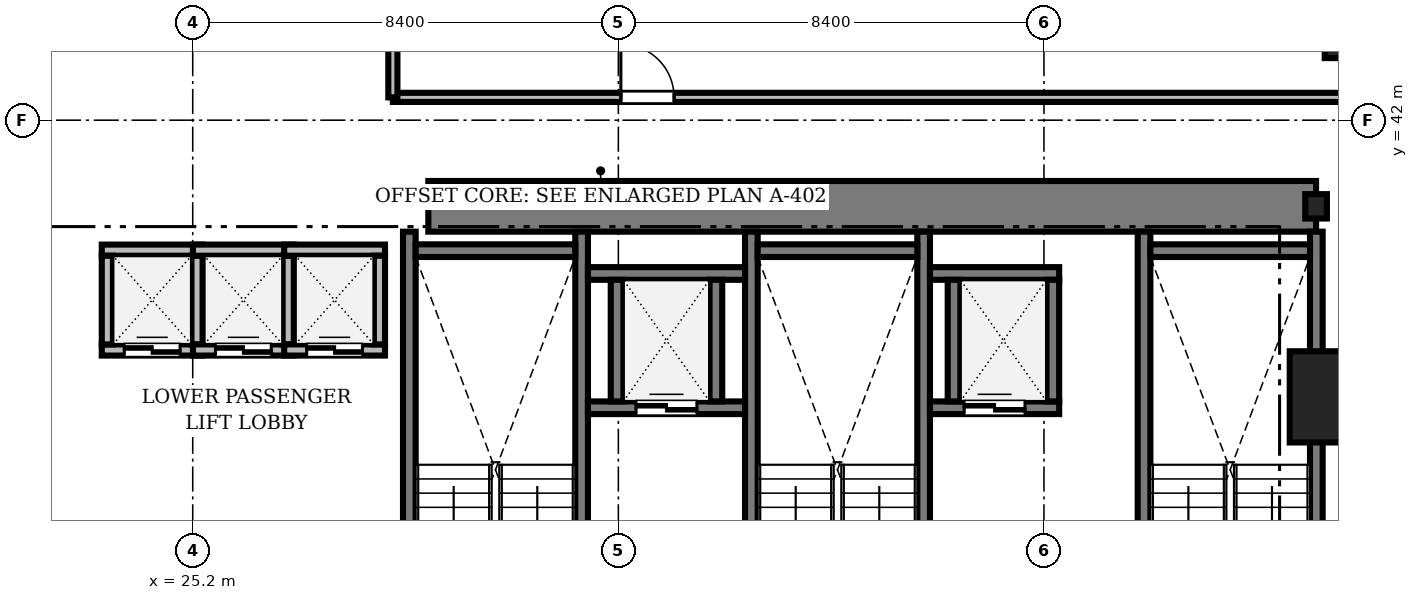
"""IFC4 building model, lengths in metres.
Left out: names, types, materials, properties, quantities, classifications, styles, units other than length and angle.
Written with IfcOpenShell. Run it as: python <this file> out.ifc"""

import sys

from ifc_helpers import new_model, si_unit, direction, frame, frame_2d, origin, origin_2d, place, context, subcontext, project, spatial, rectangle, i_section, extrude, source, transform, mapped, element, fill, save


model = new_model("IFC4")
c1 = context("Model", 3, precision=1e-05, world=origin(), true_north=direction((0.0, 1.0)))
c2 = subcontext(c1, "Body", "Model", "MODEL_VIEW")
j1 = project(units=[si_unit("LENGTHUNIT", "METRE"), si_unit("PLANEANGLEUNIT", "RADIAN")], contexts=[c1])
p1 = place(None, origin())
s1 = spatial("IfcSite", under=j1, at=p1, CompositionType="ELEMENT")
p2 = place(p1, origin())
s2 = spatial("IfcBuilding", under=s1, at=p2, CompositionType="ELEMENT")
p3 = place(p2, frame((0.0, 0.0, 27.6)))
s3 = spatial("IfcBuildingStorey", under=s2, at=p3, CompositionType="ELEMENT", Elevation=27.6)
m1 = source(origin(), c2, "Body", "SweptSolid", [
    extrude(rectangle(XDim=17.52, YDim=1.0, at=frame_2d((8.76, 0.0))), origin(), (0.0, 0.0, 1.0), 3.41),
])
p4 = place(p3, frame((29.85, 40.3, 0.0), z_axis=(0.0, 0.0, 1.0), x_axis=(1.0, 0.0, 0.0)))
e1 = element("IfcWall", 1, at=p4, inside=s3, PredefinedType="SHEAR", context=c2, shape_type="MappedRepresentation", body=[
    mapped(m1, transform((0.0, 0.0, 0.0), scale=1.0)),
])
m2 = source(origin(), c2, "Body", "SweptSolid", [
    extrude(i_section(OverallWidth=0.428, OverallDepth=0.481, WebThickness=0.04, FlangeThickness=0.063, FilletRadius=0.015, at=origin_2d()), origin(), (0.0, 0.0, 1.0), 3.41),
])
p5 = place(p3, frame((47.37, 40.3, 0.0), z_axis=(0.0, 0.0, 1.0), x_axis=(1.0, 0.0, 0.0)))
e2 = element("IfcColumn", 2, at=p5, inside=s3, PredefinedType="COLUMN", context=c2, shape_type="MappedRepresentation", body=[
    mapped(m2, transform((0.0, 0.0, 0.0), scale=1.0)),
])
m3 = source(origin(), c2, "Body", "SweptSolid", [
    extrude(rectangle(XDim=1.8, YDim=1.8, at=origin_2d()), origin(), (0.0, 0.0, 1.0), 3.41),
])
p6 = place(p3, frame((47.75, 36.54, 0.0), z_axis=(0.0, 0.0, 1.0), x_axis=(1.0, 0.0, 0.0)))
e3 = element("IfcColumn", 3, at=p6, inside=s3, PredefinedType="COLUMN", context=c2, shape_type="MappedRepresentation", body=[
    mapped(m3, transform((0.0, 0.0, 0.0), scale=1.0)),
])
m4 = source(origin(), c2, "Body", "SweptSolid", [
    extrude(i_section(OverallWidth=0.419, OverallDepth=0.449, WebThickness=0.031, FlangeThickness=0.048, FilletRadius=0.015, at=origin_2d()), origin(), (0.0, 0.0, 1.0), 3.41),
])
p7 = place(p3, frame((47.75, 43.45, 0.0), z_axis=(0.0, 0.0, 1.0), x_axis=(1.0, 0.0, 0.0)))
e4 = element("IfcColumn", 4, at=p7, inside=s3, PredefinedType="COLUMN", context=c2, shape_type="MappedRepresentation", body=[
    mapped(m4, transform((0.0, 0.0, 0.0), scale=1.0)),
])
m5 = source(origin(), c2, "Body", "SweptSolid", [
    extrude(rectangle(XDim=9.15, YDim=0.25, at=frame_2d((4.575, 0.0))), origin(), (0.0, 0.0, 1.0), 3.45),
])
for number, where, z_axis, x_axis in (
    (5, (29.475, 30.65, 0.0), (0.0, 0.0, 1.0), (0.0, 1.0, 0.0)),
    (6, (32.875, 30.65, 0.0), (0.0, 0.0, 1.0), (0.0, 1.0, 0.0)),
):
    element("IfcWall", number, at=place(p3, frame(where, z_axis=z_axis, x_axis=x_axis)), inside=s3, PredefinedType="SOLIDWALL", context=c2, shape_type="MappedRepresentation", body=[
        mapped(m5, transform((0.0, 0.0, 0.0), scale=1.0)),
    ])
m6 = source(origin(), c2, "Body", "SweptSolid", [
    extrude(rectangle(XDim=3.15, YDim=0.25, at=frame_2d((1.575, 0.0))), origin(), (0.0, 0.0, 1.0), 3.45),
])
p8 = place(p3, frame((29.6, 39.425, 0.0), z_axis=(0.0, 0.0, 1.0), x_axis=(1.0, 0.0, 0.0)))
e7 = element("IfcWall", 7, at=p8, inside=s3, PredefinedType="SOLIDWALL", context=c2, shape_type="MappedRepresentation", body=[
    mapped(m6, transform((0.0, 0.0, 0.0), scale=1.0)),
])
for number, where, z_axis, x_axis in (
    (8, (36.225, 30.65, 0.0), (0.0, 0.0, 1.0), (0.0, 1.0, 0.0)),
    (9, (39.625, 30.65, 0.0), (0.0, 0.0, 1.0), (0.0, 1.0, 0.0)),
):
    element("IfcWall", number, at=place(p3, frame(where, z_axis=z_axis, x_axis=x_axis)), inside=s3, PredefinedType="SOLIDWALL", context=c2, shape_type="MappedRepresentation", body=[
        mapped(m5, transform((0.0, 0.0, 0.0), scale=1.0)),
    ])
p9 = place(p3, frame((36.35, 39.425, 0.0), z_axis=(0.0, 0.0, 1.0), x_axis=(1.0, 0.0, 0.0)))
e10 = element("IfcWall", 10, at=p9, inside=s3, PredefinedType="SOLIDWALL", context=c2, shape_type="MappedRepresentation", body=[
    mapped(m6, transform((0.0, 0.0, 0.0), scale=1.0)),
])
for number, where, z_axis, x_axis in (
    (11, (43.975, 30.65, 0.0), (0.0, 0.0, 1.0), (0.0, 1.0, 0.0)),
    (12, (47.375, 30.65, 0.0), (0.0, 0.0, 1.0), (0.0, 1.0, 0.0)),
):
    element("IfcWall", number, at=place(p3, frame(where, z_axis=z_axis, x_axis=x_axis)), inside=s3, PredefinedType="SOLIDWALL", context=c2, shape_type="MappedRepresentation", body=[
        mapped(m5, transform((0.0, 0.0, 0.0), scale=1.0)),
    ])
p10 = place(p3, frame((44.1, 39.425, 0.0), z_axis=(0.0, 0.0, 1.0), x_axis=(1.0, 0.0, 0.0)))
e13 = element("IfcWall", 13, at=p10, inside=s3, PredefinedType="SOLIDWALL", context=c2, shape_type="MappedRepresentation", body=[
    mapped(m6, transform((0.0, 0.0, 0.0), scale=1.0)),
])
m7 = source(origin(), c2, "Body", "SweptSolid", [
    extrude(rectangle(XDim=1.99, YDim=0.22, at=frame_2d((0.995, 0.0))), origin(), (0.0, 0.0, 1.0), 3.41),
])
p11 = place(p3, frame((23.405, 37.465, 0.0), z_axis=(0.0, 0.0, 1.0), x_axis=(1.0, 0.0, 0.0)))
e14 = element("IfcWall", 14, at=p11, inside=s3, PredefinedType="SOLIDWALL", context=c2, shape_type="MappedRepresentation", body=[
    mapped(m7, transform((0.0, 0.0, 0.0), scale=1.0)),
])
m8 = source(origin(), c2, "Body", "SweptSolid", [
    extrude(rectangle(XDim=1.1, YDim=2.2, at=frame_2d((0.55, 1.1))), frame((0.0, 0.12, 0.0), z_axis=(0.0, -1.0, 0.0), x_axis=(1.0, 0.0, 0.0)), (0.0, 0.0, 1.0), 0.24),
])
p12 = place(p11, frame((0.445, 0.0, 0.0)))
e15 = element("IfcOpeningElement", 15, at=p12, cuts=e14, PredefinedType="OPENING", context=c2, shape_type="MappedRepresentation", body=[
    mapped(m8, transform((0.0, 0.0, 0.0), scale=1.0)),
])
p13 = place(p3, frame((23.405, 39.435, 0.0), z_axis=(0.0, 0.0, 1.0), x_axis=(1.0, 0.0, 0.0)))
e16 = element("IfcWall", 16, at=p13, inside=s3, PredefinedType="SOLIDWALL", context=c2, shape_type="MappedRepresentation", body=[
    mapped(m7, transform((0.0, 0.0, 0.0), scale=1.0)),
])
m9 = source(origin(), c2, "Body", "SweptSolid", [
    extrude(rectangle(XDim=1.75, YDim=0.22, at=frame_2d((0.875, 0.0))), origin(), (0.0, 0.0, 1.0), 3.41),
])
for number, where, z_axis, x_axis in (
    (17, (23.515, 37.575, 0.0), (0.0, 0.0, 1.0), (0.0, 1.0, 0.0)),
    (18, (25.285, 37.575, 0.0), (0.0, 0.0, 1.0), (0.0, 1.0, 0.0)),
):
    element("IfcWall", number, at=place(p3, frame(where, z_axis=z_axis, x_axis=x_axis)), inside=s3, PredefinedType="SOLIDWALL", context=c2, shape_type="MappedRepresentation", body=[
        mapped(m9, transform((0.0, 0.0, 0.0), scale=1.0)),
    ])
p14 = place(p3, frame((25.205, 37.465, 0.0), z_axis=(0.0, 0.0, 1.0), x_axis=(1.0, 0.0, 0.0)))
e19 = element("IfcWall", 19, at=p14, inside=s3, PredefinedType="SOLIDWALL", context=c2, shape_type="MappedRepresentation", body=[
    mapped(m7, transform((0.0, 0.0, 0.0), scale=1.0)),
])
p15 = place(p14, frame((0.445, 0.0, 0.0)))
e20 = element("IfcOpeningElement", 20, at=p15, cuts=e19, PredefinedType="OPENING", context=c2, shape_type="MappedRepresentation", body=[
    mapped(m8, transform((0.0, 0.0, 0.0), scale=1.0)),
])
p16 = place(p3, frame((25.205, 39.435, 0.0), z_axis=(0.0, 0.0, 1.0), x_axis=(1.0, 0.0, 0.0)))
e21 = element("IfcWall", 21, at=p16, inside=s3, PredefinedType="SOLIDWALL", context=c2, shape_type="MappedRepresentation", body=[
    mapped(m7, transform((0.0, 0.0, 0.0), scale=1.0)),
])
p17 = place(p3, frame((27.085, 37.575, 0.0), z_axis=(0.0, 0.0, 1.0), x_axis=(0.0, 1.0, 0.0)))
e22 = element("IfcWall", 22, at=p17, inside=s3, PredefinedType="SOLIDWALL", context=c2, shape_type="MappedRepresentation", body=[
    mapped(m9, transform((0.0, 0.0, 0.0), scale=1.0)),
])
m10 = source(origin(), c2, "Body", "SweptSolid", [
    extrude(rectangle(XDim=1.99, YDim=0.22, at=frame_2d((0.995, 0.0))), origin(), (0.0, 0.0, 1.0), 3.41),
])
p18 = place(p3, frame((27.005, 37.465, 0.0), z_axis=(0.0, 0.0, 1.0), x_axis=(1.0, 0.0, 0.0)))
e23 = element("IfcWall", 23, at=p18, inside=s3, PredefinedType="SOLIDWALL", context=c2, shape_type="MappedRepresentation", body=[
    mapped(m10, transform((0.0, 0.0, 0.0), scale=1.0)),
])
p19 = place(p18, frame((0.445, 0.0, 0.0)))
e24 = element("IfcOpeningElement", 24, at=p19, cuts=e23, PredefinedType="OPENING", context=c2, shape_type="MappedRepresentation", body=[
    mapped(m8, transform((0.0, 0.0, 0.0), scale=1.0)),
])
p20 = place(p3, frame((27.005, 39.435, 0.0), z_axis=(0.0, 0.0, 1.0), x_axis=(1.0, 0.0, 0.0)))
e25 = element("IfcWall", 25, at=p20, inside=s3, PredefinedType="SOLIDWALL", context=c2, shape_type="MappedRepresentation", body=[
    mapped(m10, transform((0.0, 0.0, 0.0), scale=1.0)),
])
p21 = place(p3, frame((28.885, 37.575, 0.0), z_axis=(0.0, 0.0, 1.0), x_axis=(0.0, 1.0, 0.0)))
e26 = element("IfcWall", 26, at=p21, inside=s3, PredefinedType="SOLIDWALL", context=c2, shape_type="MappedRepresentation", body=[
    mapped(m9, transform((0.0, 0.0, 0.0), scale=1.0)),
])
m11 = source(origin(), c2, "Body", "SweptSolid", [
    extrude(rectangle(XDim=3.1, YDim=0.25, at=frame_2d((1.55, 0.0))), origin(), (0.0, 0.0, 1.0), 3.41),
])
p22 = place(p3, frame((33.0, 36.325, 0.0), z_axis=(0.0, 0.0, 1.0), x_axis=(1.0, 0.0, 0.0)))
e27 = element("IfcWall", 27, at=p22, inside=s3, PredefinedType="SOLIDWALL", context=c2, shape_type="MappedRepresentation", body=[
    mapped(m11, transform((0.0, 0.0, 0.0), scale=1.0)),
])
m12 = source(origin(), c2, "Body", "SweptSolid", [
    extrude(rectangle(XDim=1.2, YDim=2.25, at=frame_2d((0.6, 1.125))), frame((0.0, 0.135, 0.0), z_axis=(0.0, -1.0, 0.0), x_axis=(1.0, 0.0, 0.0)), (0.0, 0.0, 1.0), 0.27),
])
p23 = place(p22, frame((0.95, 0.0, 0.0)))
e28 = element("IfcOpeningElement", 28, at=p23, cuts=e27, PredefinedType="OPENING", context=c2, shape_type="MappedRepresentation", body=[
    mapped(m12, transform((0.0, 0.0, 0.0), scale=1.0)),
])
p24 = place(p3, frame((33.0, 38.975, 0.0), z_axis=(0.0, 0.0, 1.0), x_axis=(1.0, 0.0, 0.0)))
e29 = element("IfcWall", 29, at=p24, inside=s3, PredefinedType="SOLIDWALL", context=c2, shape_type="MappedRepresentation", body=[
    mapped(m11, transform((0.0, 0.0, 0.0), scale=1.0)),
])
m13 = source(origin(), c2, "Body", "SweptSolid", [
    extrude(rectangle(XDim=2.4, YDim=0.25, at=frame_2d((1.2, 0.0))), origin(), (0.0, 0.0, 1.0), 3.41),
])
for number, where, z_axis, x_axis in (
    (30, (33.575, 36.45, 0.0), (0.0, 0.0, 1.0), (0.0, 1.0, 0.0)),
    (31, (35.525, 36.45, 0.0), (0.0, 0.0, 1.0), (0.0, 1.0, 0.0)),
):
    element("IfcWall", number, at=place(p3, frame(where, z_axis=z_axis, x_axis=x_axis)), inside=s3, PredefinedType="SOLIDWALL", context=c2, shape_type="MappedRepresentation", body=[
        mapped(m13, transform((0.0, 0.0, 0.0), scale=1.0)),
    ])
m14 = source(origin(), c2, "Body", "SweptSolid", [
    extrude(rectangle(XDim=2.55, YDim=0.25, at=frame_2d((1.275, 0.0))), origin(), (0.0, 0.0, 1.0), 3.41),
])
p25 = place(p3, frame((39.75, 36.325, 0.0), z_axis=(0.0, 0.0, 1.0), x_axis=(1.0, 0.0, 0.0)))
e32 = element("IfcWall", 32, at=p25, inside=s3, PredefinedType="SOLIDWALL", context=c2, shape_type="MappedRepresentation", body=[
    mapped(m14, transform((0.0, 0.0, 0.0), scale=1.0)),
])
p26 = place(p25, frame((0.675, 0.0, 0.0)))
e33 = element("IfcOpeningElement", 33, at=p26, cuts=e32, PredefinedType="OPENING", context=c2, shape_type="MappedRepresentation", body=[
    mapped(m12, transform((0.0, 0.0, 0.0), scale=1.0)),
])
p27 = place(p3, frame((39.75, 38.975, 0.0), z_axis=(0.0, 0.0, 1.0), x_axis=(1.0, 0.0, 0.0)))
e34 = element("IfcWall", 34, at=p27, inside=s3, PredefinedType="SOLIDWALL", context=c2, shape_type="MappedRepresentation", body=[
    mapped(m14, transform((0.0, 0.0, 0.0), scale=1.0)),
])
for number, where, z_axis, x_axis in (
    (35, (40.225, 36.45, 0.0), (0.0, 0.0, 1.0), (0.0, 1.0, 0.0)),
    (36, (42.175, 36.45, 0.0), (0.0, 0.0, 1.0), (0.0, 1.0, 0.0)),
):
    element("IfcWall", number, at=place(p3, frame(where, z_axis=z_axis, x_axis=x_axis)), inside=s3, PredefinedType="SOLIDWALL", context=c2, shape_type="MappedRepresentation", body=[
        mapped(m13, transform((0.0, 0.0, 0.0), scale=1.0)),
    ])
m15 = source(origin(), c2, "Body", "SweptSolid", [
    extrude(rectangle(XDim=19.428, YDim=0.18, at=frame_2d((9.714, 0.0))), origin(), (0.0, 0.0, 1.0), 2.652),
])
p28 = place(p3, frame((29.15, 42.45, 0.0), z_axis=(0.0, 0.0, 1.0), x_axis=(1.0, 0.0, 0.0)))
e37 = element("IfcWall", 37, at=p28, inside=s3, PredefinedType="PARTITIONING", context=c2, shape_type="MappedRepresentation", body=[
    mapped(m15, transform((0.0, 0.0, 0.0), scale=1.0)),
])
m16 = source(origin(), c2, "Body", "SweptSolid", [
    extrude(rectangle(XDim=1.05, YDim=2.2, at=frame_2d((0.525, 1.1))), frame((0.0, 0.1, 0.0), z_axis=(0.0, -1.0, 0.0), x_axis=(1.0, 0.0, 0.0)), (0.0, 0.0, 1.0), 0.2),
])
p29 = place(p28, frame((4.5, 0.0, 0.0)))
e38 = element("IfcOpeningElement", 38, at=p29, cuts=e37, PredefinedType="OPENING", context=c2, shape_type="MappedRepresentation", body=[
    mapped(m16, transform((0.0, 0.0, 0.0), scale=1.0)),
])
m17 = source(origin(), c2, "Body", "SweptSolid", [
    extrude(rectangle(XDim=5.828, YDim=0.18, at=frame_2d((2.914, 0.0))), origin(), (0.0, 0.0, 1.0), 2.652),
])
p30 = place(p3, frame((29.15, 42.45, 0.0), z_axis=(0.0, 0.0, 1.0), x_axis=(0.0, 1.0, 0.0)))
e39 = element("IfcWall", 39, at=p30, inside=s3, PredefinedType="PARTITIONING", context=c2, shape_type="MappedRepresentation", body=[
    mapped(m17, transform((0.0, 0.0, 0.0), scale=1.0)),
])
m18 = source(origin(), c2, "Body", "SweptSolid", [
    extrude(rectangle(XDim=1.1, YDim=2.2, at=frame_2d((0.55, 1.1))), frame((0.0, 0.025, 0.0), z_axis=(0.0, -1.0, 0.0), x_axis=(1.0, 0.0, 0.0)), (0.0, 0.0, 1.0), 0.05),
])
p31 = place(p12, origin())
e40 = element("IfcDoor", 40, at=p31, inside=s3, OperationType="DOUBLE_DOOR_SLIDING", PredefinedType="DOOR", context=c2, shape_type="MappedRepresentation", body=[
    mapped(m18, transform((0.0, 0.0, 0.0), scale=1.0)),
])
fill(e15, e40)
p32 = place(p15, origin())
e41 = element("IfcDoor", 41, at=p32, inside=s3, OperationType="DOUBLE_DOOR_SLIDING", PredefinedType="DOOR", context=c2, shape_type="MappedRepresentation", body=[
    mapped(m18, transform((0.0, 0.0, 0.0), scale=1.0)),
])
fill(e20, e41)
p33 = place(p19, origin())
e42 = element("IfcDoor", 42, at=p33, inside=s3, OperationType="DOUBLE_DOOR_SLIDING", PredefinedType="DOOR", context=c2, shape_type="MappedRepresentation", body=[
    mapped(m18, transform((0.0, 0.0, 0.0), scale=1.0)),
])
fill(e24, e42)
m19 = source(origin(), c2, "Body", "SweptSolid", [
    extrude(rectangle(XDim=1.2, YDim=2.25, at=frame_2d((0.6, 1.125))), frame((0.0, 0.025, 0.0), z_axis=(0.0, -1.0, 0.0), x_axis=(1.0, 0.0, 0.0)), (0.0, 0.0, 1.0), 0.05),
])
p34 = place(p23, origin())
e43 = element("IfcDoor", 43, at=p34, inside=s3, OperationType="DOUBLE_DOOR_SLIDING", PredefinedType="DOOR", context=c2, shape_type="MappedRepresentation", body=[
    mapped(m19, transform((0.0, 0.0, 0.0), scale=1.0)),
])
fill(e28, e43)
p35 = place(p26, origin())
e44 = element("IfcDoor", 44, at=p35, inside=s3, OperationType="DOUBLE_DOOR_SLIDING", PredefinedType="DOOR", context=c2, shape_type="MappedRepresentation", body=[
    mapped(m19, transform((0.0, 0.0, 0.0), scale=1.0)),
])
fill(e33, e44)
m20 = source(origin(), c2, "Body", "SweptSolid", [
    extrude(rectangle(XDim=1.05, YDim=2.2, at=frame_2d((0.525, 1.1))), frame((0.0, 0.025, 0.0), z_axis=(0.0, -1.0, 0.0), x_axis=(1.0, 0.0, 0.0)), (0.0, 0.0, 1.0), 0.05),
])
p36 = place(p29, origin())
e45 = element("IfcDoor", 45, at=p36, inside=s3, OperationType="SINGLE_SWING_LEFT", PredefinedType="DOOR", context=c2, shape_type="MappedRepresentation", body=[
    mapped(m20, transform((0.0, 0.0, 0.0), scale=1.0)),
])
fill(e38, e45)
save(model, sys.argv[1])
